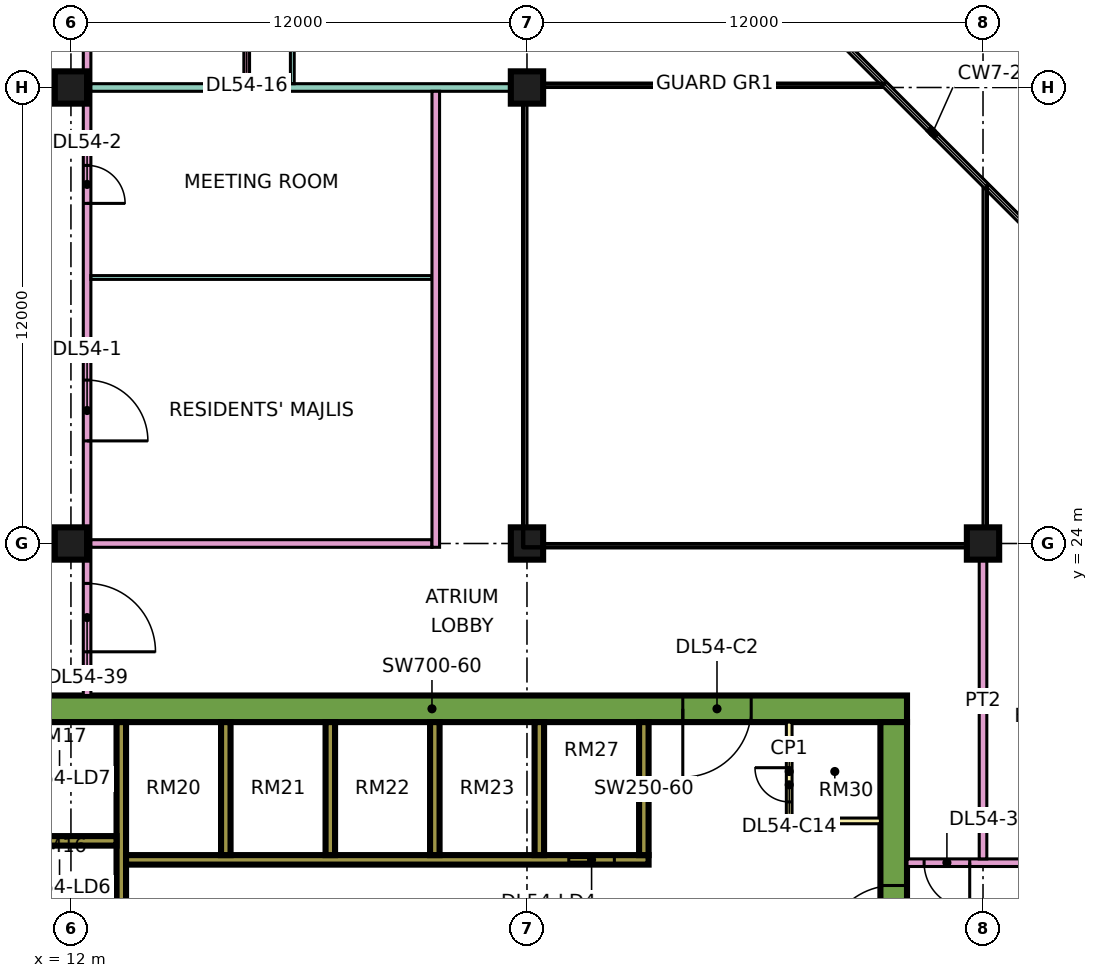
"""IFC4 building model, lengths in metres.
Left out: names, types, materials, properties, quantities, classifications, styles, units other than length and angle.
Written with IfcOpenShell. Run it as: python <this file> out.ifc"""

import sys

from ifc_helpers import new_model, si_unit, direction, frame, frame_2d, origin, origin_2d, place, context, subcontext, project, spatial, rectangle, extrude, element, fill, save


model = new_model("IFC4")
c1 = context("Model", 3, precision=1e-05, world=origin(), true_north=direction((0.0, 1.0)))
c2 = subcontext(c1, "Body", "Model", "MODEL_VIEW")
j1 = project(units=[si_unit("LENGTHUNIT", "METRE"), si_unit("PLANEANGLEUNIT", "RADIAN")], contexts=[c1])
p1 = place(None, origin())
s1 = spatial("IfcSite", under=j1, at=p1, CompositionType="ELEMENT")
p2 = place(p1, origin())
s2 = spatial("IfcBuilding", under=s1, at=p2, CompositionType="ELEMENT")
p3 = place(p2, frame((0.0, 0.0, 230.4)))
s3 = spatial("IfcBuildingStorey", under=s2, at=p3, CompositionType="ELEMENT", Elevation=230.4)
for number, where, z_axis, x_axis in (
    (1, (12.0, 24.0, 0.0), (0.0, 0.0, 1.0), (1.0, 0.0, 0.0)),
    (2, (12.0, 36.0, 0.0), (0.0, 0.0, 1.0), (1.0, 0.0, 0.0)),
    (3, (24.0, 24.0, 0.0), (0.0, 0.0, 1.0), (1.0, 0.0, 0.0)),
    (4, (24.0, 36.0, 0.0), (0.0, 0.0, 1.0), (1.0, 0.0, 0.0)),
    (5, (36.0, 24.0, 0.0), (0.0, 0.0, 1.0), (1.0, 0.0, 0.0)),
):
    element("IfcColumn", number, at=place(p3, frame(where, z_axis=z_axis, x_axis=x_axis)), inside=s3, PredefinedType="COLUMN", context=c2, shape_type="SweptSolid", body=[
        extrude(rectangle(XDim=0.85, YDim=0.85, at=origin_2d()), origin(), (0.0, 0.0, 1.0), 3.75),
    ])
p4 = place(p3, frame((9.0, 19.65, 0.0), z_axis=(0.0, 0.0, 1.0), x_axis=(1.0, 0.0, 0.0)))
e6 = element("IfcWall", 6, at=p4, inside=s3, PredefinedType="SHEAR", context=c2, shape_type="SweptSolid", body=[
    extrude(rectangle(XDim=25.0, YDim=0.7, at=frame_2d((12.5, 0.0))), origin(), (0.0, 0.0, 1.0), 3.75),
])
p5 = place(p4, frame((19.1, 0.0, 0.0)))
e7 = element("IfcOpeningElement", 7, at=p5, cuts=e6, PredefinedType="OPENING", context=c2, shape_type="SweptSolid", body=[
    extrude(rectangle(XDim=1.8, YDim=2.4, at=frame_2d((0.9, 1.2))), frame((0.0, 0.36, 0.0), z_axis=(0.0, -1.0, 0.0), x_axis=(1.0, 0.0, 0.0)), (0.0, 0.0, 1.0), 0.72),
])
p6 = place(p3, frame((33.65, 7.7, 0.0), z_axis=(0.0, 0.0, 1.0), x_axis=(0.0, 1.0, 0.0)))
e8 = element("IfcWall", 8, at=p6, inside=s3, PredefinedType="SHEAR", context=c2, shape_type="SweptSolid", body=[
    extrude(rectangle(XDim=11.6, YDim=0.7, at=frame_2d((5.8, 0.0))), origin(), (0.0, 0.0, 1.0), 3.75),
])
p7 = place(p6, frame((5.5, 0.0, 0.0)))
e9 = element("IfcOpeningElement", 9, at=p7, cuts=e8, PredefinedType="OPENING", context=c2, shape_type="SweptSolid", body=[
    extrude(rectangle(XDim=1.8, YDim=2.4, at=frame_2d((0.9, 1.2))), frame((0.0, 0.36, 0.0), z_axis=(0.0, -1.0, 0.0), x_axis=(1.0, 0.0, 0.0)), (0.0, 0.0, 1.0), 0.72),
])
p8 = place(p3, frame((13.325, 7.7, 0.0), z_axis=(0.0, 0.0, 1.0), x_axis=(0.0, 1.0, 0.0)))
e10 = element("IfcWall", 10, at=p8, inside=s3, PredefinedType="SHEAR", context=c2, shape_type="SweptSolid", body=[
    extrude(rectangle(XDim=11.6, YDim=0.25, at=frame_2d((5.8, 0.0))), origin(), (0.0, 0.0, 1.0), 3.75),
])
p9 = place(p3, frame((13.45, 15.675, 0.0), z_axis=(0.0, 0.0, 1.0), x_axis=(1.0, 0.0, 0.0)))
e11 = element("IfcWall", 11, at=p9, inside=s3, PredefinedType="SHEAR", context=c2, shape_type="SweptSolid", body=[
    extrude(rectangle(XDim=13.75, YDim=0.25, at=frame_2d((6.875, 0.0))), origin(), (0.0, 0.0, 1.0), 3.75),
])
p10 = place(p9, frame((11.65, 0.0, 0.0)))
e12 = element("IfcOpeningElement", 12, at=p10, cuts=e11, PredefinedType="OPENING", context=c2, shape_type="SweptSolid", body=[
    extrude(rectangle(XDim=1.2, YDim=2.2, at=frame_2d((0.6, 1.1))), frame((0.0, 0.135, 0.0), z_axis=(0.0, -1.0, 0.0), x_axis=(1.0, 0.0, 0.0)), (0.0, 0.0, 1.0), 0.27),
])
p11 = place(p3, frame((10.2, 16.175, 0.0), z_axis=(0.0, 0.0, 1.0), x_axis=(1.0, 0.0, 0.0)))
e13 = element("IfcWall", 13, at=p11, inside=s3, PredefinedType="SHEAR", context=c2, shape_type="SweptSolid", body=[
    extrude(rectangle(XDim=3.0, YDim=0.25, at=frame_2d((1.5, 0.0))), origin(), (0.0, 0.0, 1.0), 3.75),
])
for number, where, z_axis, x_axis in (
    (14, (16.075, 15.8, 0.0), (0.0, 0.0, 1.0), (0.0, 1.0, 0.0)),
    (15, (18.825, 15.8, 0.0), (0.0, 0.0, 1.0), (0.0, 1.0, 0.0)),
    (16, (21.575, 15.8, 0.0), (0.0, 0.0, 1.0), (0.0, 1.0, 0.0)),
    (17, (24.325, 15.8, 0.0), (0.0, 0.0, 1.0), (0.0, 1.0, 0.0)),
    (18, (27.075, 15.8, 0.0), (0.0, 0.0, 1.0), (0.0, 1.0, 0.0)),
):
    element("IfcWall", number, at=place(p3, frame(where, z_axis=z_axis, x_axis=x_axis)), inside=s3, PredefinedType="SHEAR", context=c2, shape_type="SweptSolid", body=[
        extrude(rectangle(XDim=3.5, YDim=0.25, at=frame_2d((1.75, 0.0))), origin(), (0.0, 0.0, 1.0), 3.75),
    ])
p12 = place(p3, frame((30.9, 16.7, 0.0), z_axis=(0.0, 0.0, 1.0), x_axis=(0.0, 1.0, 0.0)))
e19 = element("IfcWall", 19, at=p12, inside=s3, PredefinedType="PARTITIONING", context=c2, shape_type="SweptSolid", body=[
    extrude(rectangle(XDim=2.6, YDim=0.15, at=frame_2d((1.3, 0.0))), origin(), (0.0, 0.0, 1.0), 3.35),
])
p13 = place(p12, frame((0.5, 0.0, 0.0)))
e20 = element("IfcOpeningElement", 20, at=p13, cuts=e19, PredefinedType="OPENING", context=c2, shape_type="SweptSolid", body=[
    extrude(rectangle(XDim=0.9, YDim=2.1, at=frame_2d((0.45, 1.05))), frame((0.0, 0.085, 0.0), z_axis=(0.0, -1.0, 0.0), x_axis=(1.0, 0.0, 0.0)), (0.0, 0.0, 1.0), 0.17),
])
p14 = place(p3, frame((30.9, 16.7, 0.0), z_axis=(0.0, 0.0, 1.0), x_axis=(1.0, 0.0, 0.0)))
e21 = element("IfcWall", 21, at=p14, inside=s3, PredefinedType="PARTITIONING", context=c2, shape_type="SweptSolid", body=[
    extrude(rectangle(XDim=2.4, YDim=0.15, at=frame_2d((1.2, 0.0))), origin(), (0.0, 0.0, 1.0), 3.35),
])
p15 = place(p3, frame((12.425, 20.0, 0.0), z_axis=(0.0, 0.0, 1.0), x_axis=(0.0, 1.0, 0.0)))
e22 = element("IfcWall", 22, at=p15, inside=s3, PredefinedType="PARTITIONING", context=c2, shape_type="SweptSolid", body=[
    extrude(rectangle(XDim=42.926, YDim=0.2, at=frame_2d((21.463, 0.0))), origin(), (0.0, 0.0, 1.0), 3.35),
])
p16 = place(p15, frame((6.7, 0.0, 0.0)))
e23 = element("IfcOpeningElement", 23, at=p16, cuts=e22, PredefinedType="OPENING", context=c2, shape_type="SweptSolid", body=[
    extrude(rectangle(XDim=1.6, YDim=2.1, at=frame_2d((0.8, 1.05))), frame((0.0, 0.11, 0.0), z_axis=(0.0, -1.0, 0.0), x_axis=(1.0, 0.0, 0.0)), (0.0, 0.0, 1.0), 0.22),
])
p17 = place(p15, frame((12.95, 0.0, 0.0)))
e24 = element("IfcOpeningElement", 24, at=p17, cuts=e22, PredefinedType="OPENING", context=c2, shape_type="SweptSolid", body=[
    extrude(rectangle(XDim=1.0, YDim=2.1, at=frame_2d((0.5, 1.05))), frame((0.0, 0.11, 0.0), z_axis=(0.0, -1.0, 0.0), x_axis=(1.0, 0.0, 0.0)), (0.0, 0.0, 1.0), 0.22),
])
p18 = place(p15, frame((23.2, 0.0, 0.0)))
e25 = element("IfcOpeningElement", 25, at=p18, cuts=e22, PredefinedType="OPENING", context=c2, shape_type="SweptSolid", body=[
    extrude(rectangle(XDim=1.0, YDim=2.1, at=frame_2d((0.5, 1.05))), frame((0.0, 0.11, 0.0), z_axis=(0.0, -1.0, 0.0), x_axis=(1.0, 0.0, 0.0)), (0.0, 0.0, 1.0), 0.22),
])
p19 = place(p15, frame((35.35, 0.0, 0.0)))
e26 = element("IfcOpeningElement", 26, at=p19, cuts=e22, PredefinedType="OPENING", context=c2, shape_type="SweptSolid", body=[
    extrude(rectangle(XDim=1.0, YDim=2.1, at=frame_2d((0.5, 1.05))), frame((0.0, 0.11, 0.0), z_axis=(0.0, -1.0, 0.0), x_axis=(1.0, 0.0, 0.0)), (0.0, 0.0, 1.0), 0.22),
])
p20 = place(p15, frame((1.15, 0.0, 0.0)))
e27 = element("IfcOpeningElement", 27, at=p20, cuts=e22, PredefinedType="OPENING", context=c2, shape_type="SweptSolid", body=[
    extrude(rectangle(XDim=1.8, YDim=2.1, at=frame_2d((0.9, 1.05))), frame((0.0, 0.11, 0.0), z_axis=(0.0, -1.0, 0.0), x_axis=(1.0, 0.0, 0.0)), (0.0, 0.0, 1.0), 0.22),
])
p21 = place(p15, frame((28.6, 0.0, 0.0)))
e28 = element("IfcOpeningElement", 28, at=p21, cuts=e22, PredefinedType="OPENING", context=c2, shape_type="SweptSolid", body=[
    extrude(rectangle(XDim=1.8, YDim=2.1, at=frame_2d((0.9, 1.05))), frame((0.0, 0.11, 0.0), z_axis=(0.0, -1.0, 0.0), x_axis=(1.0, 0.0, 0.0)), (0.0, 0.0, 1.0), 0.22),
])
p22 = place(p3, frame((12.525, 24.0, 0.0), z_axis=(0.0, 0.0, 1.0), x_axis=(1.0, 0.0, 0.0)))
e29 = element("IfcWall", 29, at=p22, inside=s3, PredefinedType="PARTITIONING", context=c2, shape_type="SweptSolid", body=[
    extrude(rectangle(XDim=8.975, YDim=0.2, at=frame_2d((4.488, 0.0))), origin(), (0.0, 0.0, 1.0), 3.35),
])
p23 = place(p3, frame((12.525, 31.0, 0.0), z_axis=(0.0, 0.0, 1.0), x_axis=(1.0, 0.0, 0.0)))
e30 = element("IfcWall", 30, at=p23, inside=s3, PredefinedType="PARTITIONING", context=c2, shape_type="SweptSolid", body=[
    extrude(rectangle(XDim=8.975, YDim=0.1, at=frame_2d((4.488, 0.0))), origin(), (0.0, 0.0, 1.0), 3.35),
])
p24 = place(p3, frame((12.525, 36.0, 0.0), z_axis=(0.0, 0.0, 1.0), x_axis=(1.0, 0.0, 0.0)))
e31 = element("IfcWall", 31, at=p24, inside=s3, PredefinedType="PARTITIONING", context=c2, shape_type="SweptSolid", body=[
    extrude(rectangle(XDim=11.475, YDim=0.2, at=frame_2d((5.738, 0.0))), origin(), (0.0, 0.0, 1.0), 3.35),
])
p25 = place(p3, frame((16.625, 36.1, 0.0), z_axis=(0.0, 0.0, 1.0), x_axis=(0.0, 1.0, 0.0)))
e32 = element("IfcWall", 32, at=p25, inside=s3, PredefinedType="PARTITIONING", context=c2, shape_type="SweptSolid", body=[
    extrude(rectangle(XDim=6.275, YDim=0.15, at=frame_2d((3.137, 0.0))), origin(), (0.0, 0.0, 1.0), 3.35),
])
p26 = place(p25, frame((1.1, 0.0, 0.0)))
e33 = element("IfcOpeningElement", 33, at=p26, cuts=e32, PredefinedType="OPENING", context=c2, shape_type="SweptSolid", body=[
    extrude(rectangle(XDim=0.9, YDim=2.1, at=frame_2d((0.45, 1.05))), frame((0.0, 0.085, 0.0), z_axis=(0.0, -1.0, 0.0), x_axis=(1.0, 0.0, 0.0)), (0.0, 0.0, 1.0), 0.17),
])
p27 = place(p3, frame((17.825, 36.1, 0.0), z_axis=(0.0, 0.0, 1.0), x_axis=(0.0, 1.0, 0.0)))
e34 = element("IfcWall", 34, at=p27, inside=s3, PredefinedType="PARTITIONING", context=c2, shape_type="SweptSolid", body=[
    extrude(rectangle(XDim=2.85, YDim=0.1, at=frame_2d((1.425, 0.0))), origin(), (0.0, 0.0, 1.0), 3.35),
])
p28 = place(p27, frame((0.95, 0.0, 0.0)))
e35 = element("IfcOpeningElement", 35, at=p28, cuts=e34, PredefinedType="OPENING", context=c2, shape_type="SweptSolid", body=[
    extrude(rectangle(XDim=0.9, YDim=2.1, at=frame_2d((0.45, 1.05))), frame((0.0, 0.06, 0.0), z_axis=(0.0, -1.0, 0.0), x_axis=(1.0, 0.0, 0.0)), (0.0, 0.0, 1.0), 0.12),
])
p29 = place(p3, frame((21.6, 23.9, 0.0), z_axis=(0.0, 0.0, 1.0), x_axis=(0.0, 1.0, 0.0)))
e36 = element("IfcWall", 36, at=p29, inside=s3, PredefinedType="PARTITIONING", context=c2, shape_type="SweptSolid", body=[
    extrude(rectangle(XDim=12.0, YDim=0.2, at=frame_2d((6.0, 0.0))), origin(), (0.0, 0.0, 1.0), 3.35),
])
p30 = place(p3, frame((34.0, 15.6, 0.0), z_axis=(0.0, 0.0, 1.0), x_axis=(1.0, 0.0, 0.0)))
e37 = element("IfcWall", 37, at=p30, inside=s3, PredefinedType="PARTITIONING", context=c2, shape_type="SweptSolid", body=[
    extrude(rectangle(XDim=10.35, YDim=0.2, at=frame_2d((5.175, 0.0))), origin(), (0.0, 0.0, 1.0), 3.35),
])
p31 = place(p30, frame((5.6, 0.0, 0.0)))
e38 = element("IfcOpeningElement", 38, at=p31, cuts=e37, PredefinedType="OPENING", context=c2, shape_type="SweptSolid", body=[
    extrude(rectangle(XDim=1.0, YDim=2.1, at=frame_2d((0.5, 1.05))), frame((0.0, 0.11, 0.0), z_axis=(0.0, -1.0, 0.0), x_axis=(1.0, 0.0, 0.0)), (0.0, 0.0, 1.0), 0.22),
])
p32 = place(p30, frame((0.45, 0.0, 0.0)))
e39 = element("IfcOpeningElement", 39, at=p32, cuts=e37, PredefinedType="OPENING", context=c2, shape_type="SweptSolid", body=[
    extrude(rectangle(XDim=1.2, YDim=2.1, at=frame_2d((0.6, 1.05))), frame((0.0, 0.11, 0.0), z_axis=(0.0, -1.0, 0.0), x_axis=(1.0, 0.0, 0.0)), (0.0, 0.0, 1.0), 0.22),
])
p33 = place(p3, frame((36.0, 15.7, 0.0), z_axis=(0.0, 0.0, 1.0), x_axis=(0.0, 1.0, 0.0)))
e40 = element("IfcWall", 40, at=p33, inside=s3, PredefinedType="PARTITIONING", context=c2, shape_type="SweptSolid", body=[
    extrude(rectangle(XDim=8.3, YDim=0.2, at=frame_2d((4.15, 0.0))), origin(), (0.0, 0.0, 1.0), 3.35),
])
p34 = place(p10, origin())
e41 = element("IfcDoor", 41, at=p34, inside=s3, OperationType="DOUBLE_DOOR_SLIDING", PredefinedType="DOOR", context=c2, shape_type="SweptSolid", body=[
    extrude(rectangle(XDim=1.2, YDim=2.2, at=frame_2d((0.6, 1.1))), frame((0.0, 0.025, 0.0), z_axis=(0.0, -1.0, 0.0), x_axis=(1.0, 0.0, 0.0)), (0.0, 0.0, 1.0), 0.05),
])
fill(e12, e41)
p35 = place(p7, origin())
e42 = element("IfcDoor", 42, at=p35, inside=s3, OperationType="DOUBLE_DOOR_SINGLE_SWING", PredefinedType="DOOR", context=c2, shape_type="SweptSolid", body=[
    extrude(rectangle(XDim=1.8, YDim=2.4, at=frame_2d((0.9, 1.2))), frame((0.0, 0.025, 0.0), z_axis=(0.0, -1.0, 0.0), x_axis=(1.0, 0.0, 0.0)), (0.0, 0.0, 1.0), 0.05),
])
fill(e9, e42)
p36 = place(p5, frame((1.8, 0.0, 0.0), z_axis=(0.0, 0.0, 1.0), x_axis=(-1.0, 0.0, 0.0)))
e43 = element("IfcDoor", 43, at=p36, inside=s3, OperationType="DOUBLE_DOOR_SINGLE_SWING", PredefinedType="DOOR", context=c2, shape_type="SweptSolid", body=[
    extrude(rectangle(XDim=1.8, YDim=2.4, at=frame_2d((0.9, 1.2))), frame((0.0, 0.025, 0.0), z_axis=(0.0, -1.0, 0.0), x_axis=(1.0, 0.0, 0.0)), (0.0, 0.0, 1.0), 0.05),
])
fill(e7, e43)
p37 = place(p13, frame((0.9, 0.0, 0.0), z_axis=(0.0, 0.0, 1.0), x_axis=(-1.0, 0.0, 0.0)))
e44 = element("IfcDoor", 44, at=p37, inside=s3, OperationType="SINGLE_SWING_RIGHT", PredefinedType="DOOR", context=c2, shape_type="SweptSolid", body=[
    extrude(rectangle(XDim=0.9, YDim=2.1, at=frame_2d((0.45, 1.05))), frame((0.0, 0.025, 0.0), z_axis=(0.0, -1.0, 0.0), x_axis=(1.0, 0.0, 0.0)), (0.0, 0.0, 1.0), 0.05),
])
fill(e20, e44)
p38 = place(p16, frame((1.6, 0.0, 0.0), z_axis=(0.0, 0.0, 1.0), x_axis=(-1.0, 0.0, 0.0)))
e45 = element("IfcDoor", 45, at=p38, inside=s3, OperationType="DOUBLE_DOOR_SINGLE_SWING", PredefinedType="DOOR", context=c2, shape_type="SweptSolid", body=[
    extrude(rectangle(XDim=1.6, YDim=2.1, at=frame_2d((0.8, 1.05))), frame((0.0, 0.025, 0.0), z_axis=(0.0, -1.0, 0.0), x_axis=(1.0, 0.0, 0.0)), (0.0, 0.0, 1.0), 0.05),
])
fill(e23, e45)
p39 = place(p17, frame((1.0, 0.0, 0.0), z_axis=(0.0, 0.0, 1.0), x_axis=(-1.0, 0.0, 0.0)))
e46 = element("IfcDoor", 46, at=p39, inside=s3, OperationType="SINGLE_SWING_LEFT", PredefinedType="DOOR", context=c2, shape_type="SweptSolid", body=[
    extrude(rectangle(XDim=1.0, YDim=2.1, at=frame_2d((0.5, 1.05))), frame((0.0, 0.025, 0.0), z_axis=(0.0, -1.0, 0.0), x_axis=(1.0, 0.0, 0.0)), (0.0, 0.0, 1.0), 0.05),
])
fill(e24, e46)
p40 = place(p32, origin())
e47 = element("IfcDoor", 47, at=p40, inside=s3, OperationType="SINGLE_SWING_RIGHT", PredefinedType="DOOR", context=c2, shape_type="SweptSolid", body=[
    extrude(rectangle(XDim=1.2, YDim=2.1, at=frame_2d((0.6, 1.05))), frame((0.0, 0.025, 0.0), z_axis=(0.0, -1.0, 0.0), x_axis=(1.0, 0.0, 0.0)), (0.0, 0.0, 1.0), 0.05),
])
fill(e39, e47)
p41 = place(p20, frame((1.8, 0.0, 0.0), z_axis=(0.0, 0.0, 1.0), x_axis=(-1.0, 0.0, 0.0)))
e48 = element("IfcDoor", 48, at=p41, inside=s3, OperationType="DOUBLE_DOOR_SINGLE_SWING", PredefinedType="DOOR", context=c2, shape_type="SweptSolid", body=[
    extrude(rectangle(XDim=1.8, YDim=2.1, at=frame_2d((0.9, 1.05))), frame((0.0, 0.025, 0.0), z_axis=(0.0, -1.0, 0.0), x_axis=(1.0, 0.0, 0.0)), (0.0, 0.0, 1.0), 0.05),
])
fill(e27, e48)
save(model, sys.argv[1])
